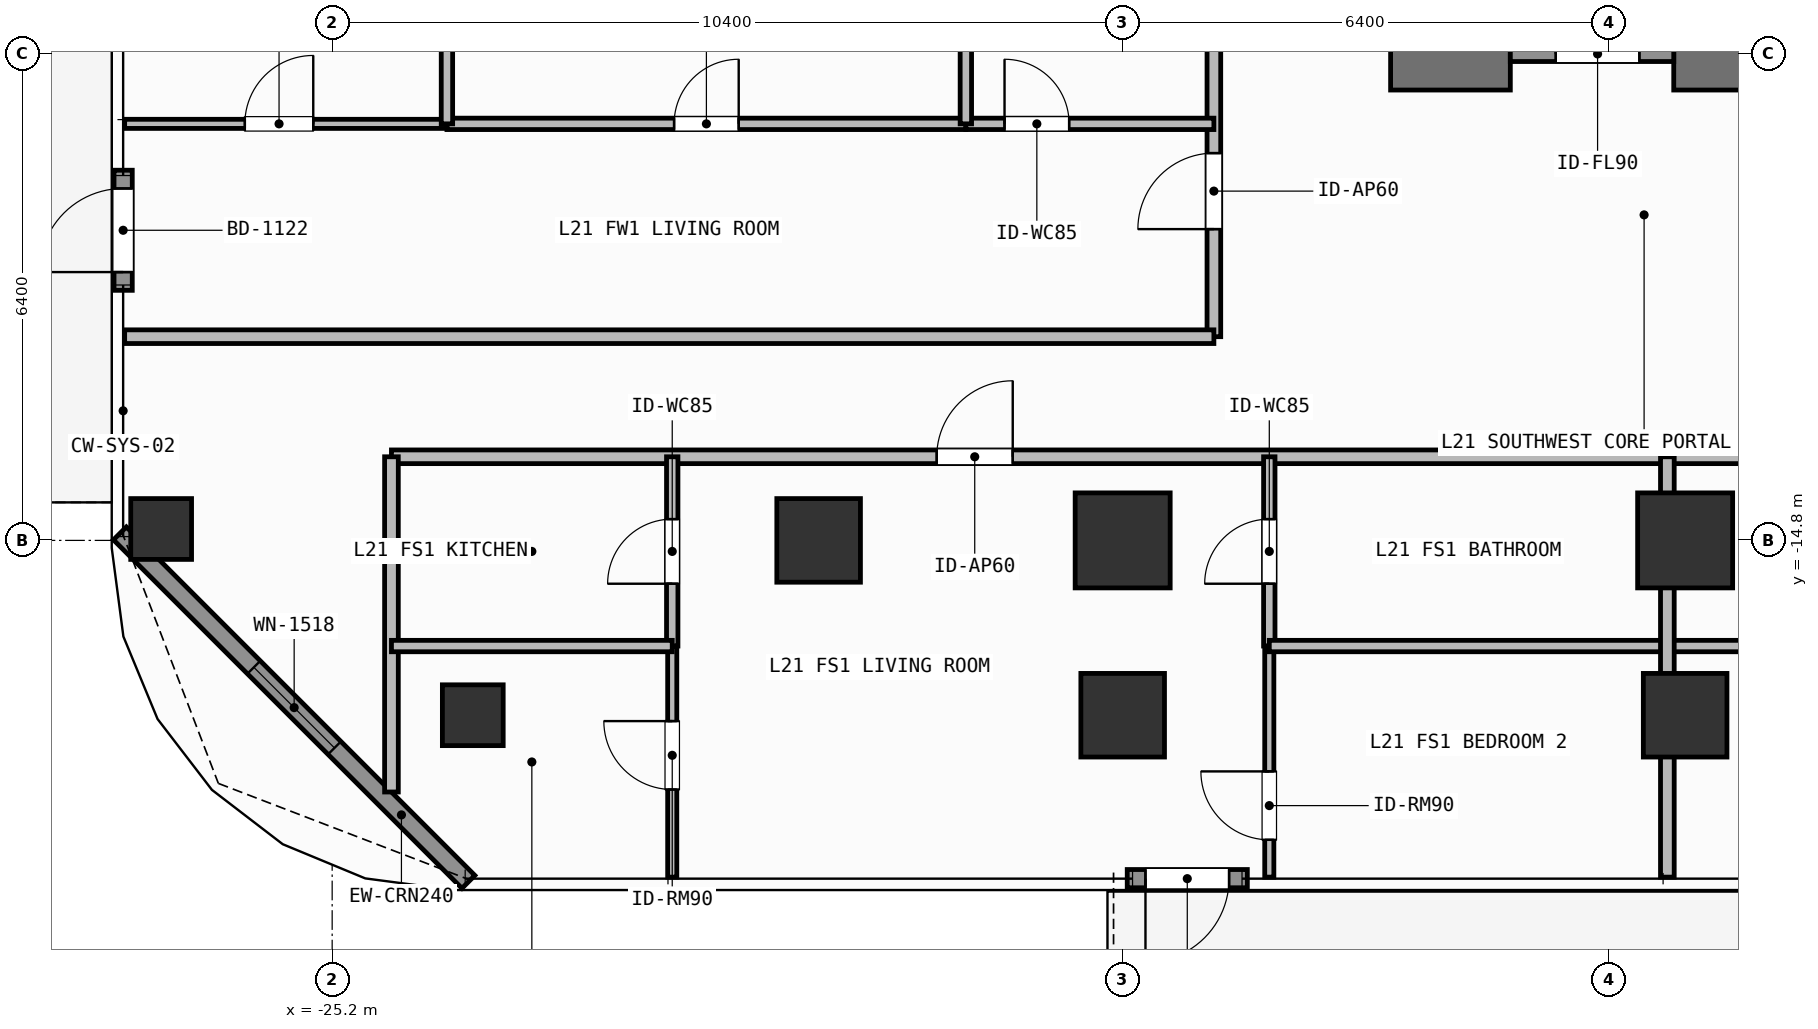
"""IFC4 building model, lengths in metres.
Left out: names, types, materials, properties, quantities, classifications, styles, units other than length and angle.
Written with IfcOpenShell. Run it as: python <this file> out.ifc"""

import sys

from ifc_helpers import new_model, si_unit, direction, frame, frame_2d, origin, origin_2d, place, context, subcontext, project, spatial, rectangle, hollow_rectangle, extrude, element, fill, save


model = new_model("IFC4")
c1 = context("Model", 3, precision=1e-05, world=origin(), true_north=direction((0.0, 1.0)))
c2 = subcontext(c1, "Body", "Model", "MODEL_VIEW")
j1 = project(units=[si_unit("LENGTHUNIT", "METRE"), si_unit("PLANEANGLEUNIT", "RADIAN")], contexts=[c1])
p1 = place(None, origin())
s1 = spatial("IfcSite", under=j1, at=p1, CompositionType="ELEMENT")
p2 = place(p1, origin())
s2 = spatial("IfcBuilding", under=s1, at=p2, CompositionType="ELEMENT")
p3 = place(p2, frame((0.0, 0.0, 85.2)))
s3 = spatial("IfcBuildingStorey", under=s2, at=p3, CompositionType="ELEMENT", Elevation=85.2)
p4 = place(p3, frame((-11.275, -8.4, 0.0), z_axis=(0.0, 0.0, 1.0), x_axis=(1.0, 0.0, 0.0)))
e1 = element("IfcWall", 1, at=p4, inside=s3, PredefinedType="SHEAR", context=c2, shape_type="SweptSolid", body=[
    extrude(rectangle(XDim=1.575, YDim=0.95, at=frame_2d((0.788, 0.0))), origin(), (0.0, 0.0, 1.0), 3.9),
])
p5 = place(p3, frame((-7.55, -8.4, 0.0), z_axis=(0.0, 0.0, 1.0), x_axis=(1.0, 0.0, 0.0)))
e2 = element("IfcWall", 2, at=p5, inside=s3, PredefinedType="SHEAR", context=c2, shape_type="SweptSolid", body=[
    extrude(rectangle(XDim=3.35, YDim=0.95, at=frame_2d((1.675, 0.0))), origin(), (0.0, 0.0, 1.0), 3.9),
])
for number, where, z_axis, x_axis in (
    (3, (-14.8, -14.8, 0.0), (0.0, 0.0, 1.0), (1.0, 0.0, 0.0)),
    (4, (-7.4, -14.8, 0.0), (0.0, 0.0, 1.0), (1.0, 0.0, 0.0)),
):
    element("IfcColumn", number, at=place(p3, frame(where, z_axis=z_axis, x_axis=x_axis)), inside=s3, PredefinedType="COLUMN", context=c2, shape_type="SweptSolid", body=[
        extrude(rectangle(XDim=1.25, YDim=1.25, at=origin_2d()), origin(), (0.0, 0.0, 1.0), 3.9),
    ])
for number, where, z_axis, x_axis in (
    (5, (-18.8, -14.8, 0.0), (0.0, 0.0, 1.0), (1.0, 0.0, 0.0)),
    (6, (-14.8, -17.1, 0.0), (0.0, 0.0, 1.0), (1.0, 0.0, 0.0)),
    (7, (-7.4, -17.1, 0.0), (0.0, 0.0, 1.0), (1.0, 0.0, 0.0)),
):
    element("IfcColumn", number, at=place(p3, frame(where, z_axis=z_axis, x_axis=x_axis)), inside=s3, PredefinedType="COLUMN", context=c2, shape_type="SweptSolid", body=[
        extrude(rectangle(XDim=1.1, YDim=1.1, at=origin_2d()), origin(), (0.0, 0.0, 1.0), 3.9),
    ])
for number, where, z_axis, x_axis in (
    (8, (-23.35, -17.1, 0.0), (0.0, 0.0, 1.0), (1.0, 0.0, 0.0)),
    (9, (-27.45, -14.65, 0.0), (0.0, 0.0, 1.0), (1.0, 0.0, 0.0)),
):
    element("IfcColumn", number, at=place(p3, frame(where, z_axis=z_axis, x_axis=x_axis)), inside=s3, PredefinedType="COLUMN", context=c2, shape_type="SweptSolid", body=[
        extrude(hollow_rectangle(XDim=0.8, YDim=0.8, WallThickness=0.036, at=origin_2d()), origin(), (0.0, 0.0, 1.0), 3.9),
    ])
p6 = place(p3, frame((-13.16, -19.25, 0.0), z_axis=(0.0, 0.0, 1.0), x_axis=(-1.0, 0.0, 0.0)))
e10 = element("IfcWall", 10, at=p6, inside=s3, PredefinedType="SOLIDWALL", context=c2, shape_type="SweptSolid", body=[
    extrude(rectangle(XDim=1.58, YDim=0.24, at=frame_2d((0.79, 0.0))), origin(), (0.0, 0.0, 1.0), 3.68),
])
p7 = place(p6, frame((0.24, 0.0, 0.0)))
e11 = element("IfcOpeningElement", 11, at=p7, cuts=e10, PredefinedType="OPENING", context=c2, shape_type="SweptSolid", body=[
    extrude(rectangle(XDim=1.1, YDim=2.2, at=frame_2d((0.55, 1.1))), frame((0.0, 0.13, 0.0), z_axis=(0.0, -1.0, 0.0), x_axis=(1.0, 0.0, 0.0)), (0.0, 0.0, 1.0), 0.26),
])
p8 = place(p3, frame((-27.95, -11.51, 0.0), z_axis=(0.0, 0.0, 1.0), x_axis=(0.0, 1.0, 0.0)))
e12 = element("IfcWall", 12, at=p8, inside=s3, PredefinedType="SOLIDWALL", context=c2, shape_type="SweptSolid", body=[
    extrude(rectangle(XDim=1.58, YDim=0.24, at=frame_2d((0.79, 0.0))), origin(), (0.0, 0.0, 1.0), 3.68),
])
p9 = place(p8, frame((0.24, 0.0, 0.0)))
e13 = element("IfcOpeningElement", 13, at=p9, cuts=e12, PredefinedType="OPENING", context=c2, shape_type="SweptSolid", body=[
    extrude(rectangle(XDim=1.1, YDim=2.2, at=frame_2d((0.55, 1.1))), frame((0.0, 0.13, 0.0), z_axis=(0.0, -1.0, 0.0), x_axis=(1.0, 0.0, 0.0)), (0.0, 0.0, 1.0), 0.26),
])
p10 = place(p3, frame((-23.408, -19.292, 0.0), z_axis=(0.0, 0.0, 1.0), x_axis=(-0.707087954376, 0.707125607496, 0.0)))
e14 = element("IfcWall", 14, at=p10, inside=s3, PredefinedType="SOLIDWALL", context=c2, shape_type="SweptSolid", body=[
    extrude(rectangle(XDim=6.484, YDim=0.24, at=frame_2d((3.242, 0.0))), origin(), (0.0, 0.0, 1.0), 3.68),
])
p11 = place(p10, frame((2.492, 0.0, 0.8)))
e15 = element("IfcOpeningElement", 15, at=p11, cuts=e14, PredefinedType="OPENING", context=c2, shape_type="SweptSolid", body=[
    extrude(rectangle(XDim=1.5, YDim=1.85, at=frame_2d((0.75, 0.925))), frame((0.0, 0.13, 0.0), z_axis=(0.0, -1.0, 0.0), x_axis=(1.0, 0.0, 0.0)), (0.0, 0.0, 1.0), 0.26),
])
p12 = place(p3, frame((-9.7, -8.4, 0.0), z_axis=(0.0, 0.0, 1.0), x_axis=(1.0, 0.0, 0.0)))
e16 = element("IfcWall", 16, at=p12, inside=s3, PredefinedType="SOLIDWALL", context=c2, shape_type="SweptSolid", body=[
    extrude(rectangle(XDim=2.15, YDim=0.2, at=frame_2d((1.075, 0.0))), origin(), (0.0, 0.0, 1.0), 2.72),
])
p13 = place(p12, frame((0.598, 0.0, 0.0)))
e17 = element("IfcOpeningElement", 17, at=p13, cuts=e16, PredefinedType="OPENING", context=c2, shape_type="SweptSolid", body=[
    extrude(rectangle(XDim=1.1, YDim=2.15, at=frame_2d((0.55, 1.075))), frame((0.0, 0.11, 0.0), z_axis=(0.0, -1.0, 0.0), x_axis=(1.0, 0.0, 0.0)), (0.0, 0.0, 1.0), 0.22),
])
p14 = place(p3, frame((-24.42, -13.7, 0.0), z_axis=(0.0, 0.0, 1.0), x_axis=(1.0, 0.0, 0.0)))
e18 = element("IfcWall", 18, at=p14, inside=s3, PredefinedType="PARTITIONING", context=c2, shape_type="SweptSolid", body=[
    extrude(rectangle(XDim=16.786, YDim=0.18, at=frame_2d((8.393, 0.0))), origin(), (0.0, 0.0, 1.0), 3.68),
])
p15 = place(p14, frame((7.174, 0.0, 0.0)))
e19 = element("IfcOpeningElement", 19, at=p15, cuts=e18, PredefinedType="OPENING", context=c2, shape_type="SweptSolid", body=[
    extrude(rectangle(XDim=1.0, YDim=2.2, at=frame_2d((0.5, 1.1))), frame((0.0, 0.1, 0.0), z_axis=(0.0, -1.0, 0.0), x_axis=(1.0, 0.0, 0.0)), (0.0, 0.0, 1.0), 0.2),
])
p16 = place(p3, frame((-20.726, -16.19, 0.0), z_axis=(0.0, 0.0, 1.0), x_axis=(0.0, 1.0, 0.0)))
e20 = element("IfcWall", 20, at=p16, inside=s3, PredefinedType="PARTITIONING", context=c2, shape_type="SweptSolid", body=[
    extrude(rectangle(XDim=2.49, YDim=0.15, at=frame_2d((1.245, 0.0))), origin(), (0.0, 0.0, 1.0), 3.68),
])
p17 = place(p16, frame((0.82, 0.0, 0.0)))
e21 = element("IfcOpeningElement", 21, at=p17, cuts=e20, PredefinedType="OPENING", context=c2, shape_type="SweptSolid", body=[
    extrude(rectangle(XDim=0.85, YDim=2.1, at=frame_2d((0.425, 1.05))), frame((0.0, 0.085, 0.0), z_axis=(0.0, -1.0, 0.0), x_axis=(1.0, 0.0, 0.0)), (0.0, 0.0, 1.0), 0.17),
])
p18 = place(p3, frame((-20.726, -19.23, 0.0), z_axis=(0.0, 0.0, 1.0), x_axis=(0.0, 1.0, 0.0)))
e22 = element("IfcWall", 22, at=p18, inside=s3, PredefinedType="PARTITIONING", context=c2, shape_type="SweptSolid", body=[
    extrude(rectangle(XDim=3.04, YDim=0.12, at=frame_2d((1.52, 0.0))), origin(), (0.0, 0.0, 1.0), 3.68),
])
p19 = place(p18, frame((1.153, 0.0, 0.0)))
e23 = element("IfcOpeningElement", 23, at=p19, cuts=e22, PredefinedType="OPENING", context=c2, shape_type="SweptSolid", body=[
    extrude(rectangle(XDim=0.9, YDim=2.1, at=frame_2d((0.45, 1.05))), frame((0.0, 0.07, 0.0), z_axis=(0.0, -1.0, 0.0), x_axis=(1.0, 0.0, 0.0)), (0.0, 0.0, 1.0), 0.14),
])
p20 = place(p3, frame((-12.871, -16.19, 0.0), z_axis=(0.0, 0.0, 1.0), x_axis=(0.0, 1.0, 0.0)))
e24 = element("IfcWall", 24, at=p20, inside=s3, PredefinedType="PARTITIONING", context=c2, shape_type="SweptSolid", body=[
    extrude(rectangle(XDim=2.49, YDim=0.15, at=frame_2d((1.245, 0.0))), origin(), (0.0, 0.0, 1.0), 3.68),
])
p21 = place(p20, frame((0.82, 0.0, 0.0)))
e25 = element("IfcOpeningElement", 25, at=p21, cuts=e24, PredefinedType="OPENING", context=c2, shape_type="SweptSolid", body=[
    extrude(rectangle(XDim=0.85, YDim=2.1, at=frame_2d((0.425, 1.05))), frame((0.0, 0.085, 0.0), z_axis=(0.0, -1.0, 0.0), x_axis=(1.0, 0.0, 0.0)), (0.0, 0.0, 1.0), 0.17),
])
p22 = place(p3, frame((-12.871, -19.23, 0.0), z_axis=(0.0, 0.0, 1.0), x_axis=(0.0, 1.0, 0.0)))
e26 = element("IfcWall", 26, at=p22, inside=s3, PredefinedType="PARTITIONING", context=c2, shape_type="SweptSolid", body=[
    extrude(rectangle(XDim=3.04, YDim=0.12, at=frame_2d((1.52, 0.0))), origin(), (0.0, 0.0, 1.0), 3.68),
])
p23 = place(p22, frame((0.491, 0.0, 0.0)))
e27 = element("IfcOpeningElement", 27, at=p23, cuts=e26, PredefinedType="OPENING", context=c2, shape_type="SweptSolid", body=[
    extrude(rectangle(XDim=0.9, YDim=2.1, at=frame_2d((0.45, 1.05))), frame((0.0, 0.07, 0.0), z_axis=(0.0, -1.0, 0.0), x_axis=(1.0, 0.0, 0.0)), (0.0, 0.0, 1.0), 0.14),
])
p24 = place(p3, frame((-7.634, -13.7, 0.0), z_axis=(0.0, 0.0, 1.0), x_axis=(1.0, 0.0, 0.0)))
e28 = element("IfcWall", 28, at=p24, inside=s3, PredefinedType="PARTITIONING", context=c2, shape_type="SweptSolid", body=[
    extrude(rectangle(XDim=26.254, YDim=0.18, at=frame_2d((13.127, 0.0))), origin(), (0.0, 0.0, 1.0), 3.68),
])
p25 = place(p24, frame((12.178, 0.0, 0.0)))
e29 = element("IfcOpeningElement", 29, at=p25, cuts=e28, PredefinedType="OPENING", context=c2, shape_type="SweptSolid", body=[
    extrude(rectangle(XDim=1.0, YDim=2.2, at=frame_2d((0.5, 1.1))), frame((0.0, 0.1, 0.0), z_axis=(0.0, -1.0, 0.0), x_axis=(1.0, 0.0, 0.0)), (0.0, 0.0, 1.0), 0.2),
])
p26 = place(p3, frame((-13.6, -12.12, 0.0), z_axis=(0.0, 0.0, 1.0), x_axis=(0.0, 1.0, 0.0)))
e30 = element("IfcWall", 30, at=p26, inside=s3, PredefinedType="PARTITIONING", context=c2, shape_type="SweptSolid", body=[
    extrude(rectangle(XDim=9.389, YDim=0.18, at=frame_2d((4.695, 0.0))), origin(), (0.0, 0.0, 1.0), 3.68),
])
p27 = place(p26, frame((1.415, 0.0, 0.0)))
e31 = element("IfcOpeningElement", 31, at=p27, cuts=e30, PredefinedType="OPENING", context=c2, shape_type="SweptSolid", body=[
    extrude(rectangle(XDim=1.0, YDim=2.2, at=frame_2d((0.5, 1.1))), frame((0.0, 0.1, 0.0), z_axis=(0.0, -1.0, 0.0), x_axis=(1.0, 0.0, 0.0)), (0.0, 0.0, 1.0), 0.2),
])
p28 = place(p3, frame((-23.69, -9.32, 0.0), z_axis=(0.0, 0.0, 1.0), x_axis=(1.0, 0.0, 0.0)))
e32 = element("IfcWall", 32, at=p28, inside=s3, PredefinedType="PARTITIONING", context=c2, shape_type="SweptSolid", body=[
    extrude(rectangle(XDim=6.827, YDim=0.15, at=frame_2d((3.414, 0.0))), origin(), (0.0, 0.0, 1.0), 3.68),
])
p29 = place(p28, frame((2.989, 0.0, 0.0)))
e33 = element("IfcOpeningElement", 33, at=p29, cuts=e32, PredefinedType="OPENING", context=c2, shape_type="SweptSolid", body=[
    extrude(rectangle(XDim=0.85, YDim=2.1, at=frame_2d((0.425, 1.05))), frame((0.0, 0.085, 0.0), z_axis=(0.0, -1.0, 0.0), x_axis=(1.0, 0.0, 0.0)), (0.0, 0.0, 1.0), 0.17),
])
p30 = place(p3, frame((-16.863, -9.32, 0.0), z_axis=(0.0, 0.0, 1.0), x_axis=(1.0, 0.0, 0.0)))
e34 = element("IfcWall", 34, at=p30, inside=s3, PredefinedType="PARTITIONING", context=c2, shape_type="SweptSolid", body=[
    extrude(rectangle(XDim=3.263, YDim=0.15, at=frame_2d((1.631, 0.0))), origin(), (0.0, 0.0, 1.0), 3.68),
])
p31 = place(p30, frame((0.509, 0.0, 0.0)))
e35 = element("IfcOpeningElement", 35, at=p31, cuts=e34, PredefinedType="OPENING", context=c2, shape_type="SweptSolid", body=[
    extrude(rectangle(XDim=0.85, YDim=2.1, at=frame_2d((0.425, 1.05))), frame((0.0, 0.085, 0.0), z_axis=(0.0, -1.0, 0.0), x_axis=(1.0, 0.0, 0.0)), (0.0, 0.0, 1.0), 0.17),
])
p32 = place(p3, frame((-27.93, -9.32, 0.0), z_axis=(0.0, 0.0, 1.0), x_axis=(1.0, 0.0, 0.0)))
e36 = element("IfcWall", 36, at=p32, inside=s3, PredefinedType="PARTITIONING", context=c2, shape_type="SweptSolid", body=[
    extrude(rectangle(XDim=4.24, YDim=0.12, at=frame_2d((2.12, 0.0))), origin(), (0.0, 0.0, 1.0), 3.68),
])
p33 = place(p32, frame((1.581, 0.0, 0.0)))
e37 = element("IfcOpeningElement", 37, at=p33, cuts=e36, PredefinedType="OPENING", context=c2, shape_type="SweptSolid", body=[
    extrude(rectangle(XDim=0.9, YDim=2.1, at=frame_2d((0.45, 1.05))), frame((0.0, 0.07, 0.0), z_axis=(0.0, -1.0, 0.0), x_axis=(1.0, 0.0, 0.0)), (0.0, 0.0, 1.0), 0.14),
])
p34 = place(p3, frame((-24.42, -18.11, 0.0), z_axis=(0.0, 0.0, 1.0), x_axis=(0.0, 1.0, 0.0)))
e38 = element("IfcWall", 38, at=p34, inside=s3, PredefinedType="PARTITIONING", context=c2, shape_type="SweptSolid", body=[
    extrude(rectangle(XDim=4.41, YDim=0.18, at=frame_2d((2.205, 0.0))), origin(), (0.0, 0.0, 1.0), 3.68),
])
p35 = place(p3, frame((-24.42, -16.19, 0.0), z_axis=(0.0, 0.0, 1.0), x_axis=(1.0, 0.0, 0.0)))
e39 = element("IfcWall", 39, at=p35, inside=s3, PredefinedType="PARTITIONING", context=c2, shape_type="SweptSolid", body=[
    extrude(rectangle(XDim=3.694, YDim=0.15, at=frame_2d((1.847, 0.0))), origin(), (0.0, 0.0, 1.0), 3.68),
])
p36 = place(p3, frame((-12.871, -16.19, 0.0), z_axis=(0.0, 0.0, 1.0), x_axis=(1.0, 0.0, 0.0)))
e40 = element("IfcWall", 40, at=p36, inside=s3, PredefinedType="PARTITIONING", context=c2, shape_type="SweptSolid", body=[
    extrude(rectangle(XDim=5.237, YDim=0.15, at=frame_2d((2.619, 0.0))), origin(), (0.0, 0.0, 1.0), 3.68),
])
p37 = place(p3, frame((-7.634, -16.19, 0.0), z_axis=(0.0, 0.0, 1.0), x_axis=(1.0, 0.0, 0.0)))
e41 = element("IfcWall", 41, at=p37, inside=s3, PredefinedType="PARTITIONING", context=c2, shape_type="SweptSolid", body=[
    extrude(rectangle(XDim=5.394, YDim=0.15, at=frame_2d((2.697, 0.0))), origin(), (0.0, 0.0, 1.0), 3.68),
])
p38 = place(p3, frame((-7.634, -19.23, 0.0), z_axis=(0.0, 0.0, 1.0), x_axis=(0.0, 1.0, 0.0)))
e42 = element("IfcWall", 42, at=p38, inside=s3, PredefinedType="PARTITIONING", context=c2, shape_type="SweptSolid", body=[
    extrude(rectangle(XDim=5.53, YDim=0.18, at=frame_2d((2.765, 0.0))), origin(), (0.0, 0.0, 1.0), 3.082),
])
for number, where, z_axis, x_axis in (
    (43, (-16.863, -9.32, 0.0), (0.0, 0.0, 1.0), (0.0, 1.0, 0.0)),
    (44, (-23.69, -9.32, 0.0), (0.0, 0.0, 1.0), (0.0, 1.0, 0.0)),
):
    element("IfcWall", number, at=place(p3, frame(where, z_axis=z_axis, x_axis=x_axis)), inside=s3, PredefinedType="PARTITIONING", context=c2, shape_type="SweptSolid", body=[
        extrude(rectangle(XDim=6.589, YDim=0.15, at=frame_2d((3.294, 0.0))), origin(), (0.0, 0.0, 1.0), 3.68),
    ])
p39 = place(p3, frame((-27.93, -12.12, 0.0), z_axis=(0.0, 0.0, 1.0), x_axis=(1.0, 0.0, 0.0)))
e45 = element("IfcWall", 45, at=p39, inside=s3, PredefinedType="PARTITIONING", context=c2, shape_type="SweptSolid", body=[
    extrude(rectangle(XDim=14.33, YDim=0.18, at=frame_2d((7.165, 0.0))), origin(), (0.0, 0.0, 1.0), 3.68),
])
p40 = place(p7, origin())
e46 = element("IfcDoor", 46, at=p40, inside=s3, OperationType="SINGLE_SWING_RIGHT", PredefinedType="DOOR", context=c2, shape_type="SweptSolid", body=[
    extrude(rectangle(XDim=1.1, YDim=2.2, at=frame_2d((0.55, 1.1))), frame((0.0, 0.025, 0.0), z_axis=(0.0, -1.0, 0.0), x_axis=(1.0, 0.0, 0.0)), (0.0, 0.0, 1.0), 0.05),
])
fill(e11, e46)
p41 = place(p9, origin())
e47 = element("IfcDoor", 47, at=p41, inside=s3, OperationType="SINGLE_SWING_LEFT", PredefinedType="DOOR", context=c2, shape_type="SweptSolid", body=[
    extrude(rectangle(XDim=1.1, YDim=2.2, at=frame_2d((0.55, 1.1))), frame((0.0, 0.025, 0.0), z_axis=(0.0, -1.0, 0.0), x_axis=(1.0, 0.0, 0.0)), (0.0, 0.0, 1.0), 0.05),
])
fill(e13, e47)
p42 = place(p11, origin())
e48 = element("IfcWindow", 48, at=p42, inside=s3, PartitioningType="SINGLE_PANEL", PredefinedType="WINDOW", context=c2, shape_type="SweptSolid", body=[
    extrude(rectangle(XDim=1.5, YDim=1.85, at=frame_2d((0.75, 0.925))), frame((0.0, 0.03, 0.0), z_axis=(0.0, -1.0, 0.0), x_axis=(1.0, 0.0, 0.0)), (0.0, 0.0, 1.0), 0.06),
])
fill(e15, e48)
p43 = place(p13, origin())
e49 = element("IfcDoor", 49, at=p43, inside=s3, OperationType="SINGLE_SWING_LEFT", PredefinedType="DOOR", context=c2, shape_type="SweptSolid", body=[
    extrude(rectangle(XDim=1.1, YDim=2.15, at=frame_2d((0.55, 1.075))), frame((0.0, 0.025, 0.0), z_axis=(0.0, -1.0, 0.0), x_axis=(1.0, 0.0, 0.0)), (0.0, 0.0, 1.0), 0.05),
])
fill(e17, e49)
p44 = place(p15, origin())
e50 = element("IfcDoor", 50, at=p44, inside=s3, OperationType="SINGLE_SWING_RIGHT", PredefinedType="DOOR", context=c2, shape_type="SweptSolid", body=[
    extrude(rectangle(XDim=1.0, YDim=2.2, at=frame_2d((0.5, 1.1))), frame((0.0, 0.025, 0.0), z_axis=(0.0, -1.0, 0.0), x_axis=(1.0, 0.0, 0.0)), (0.0, 0.0, 1.0), 0.05),
])
fill(e19, e50)
p45 = place(p17, origin())
e51 = element("IfcDoor", 51, at=p45, inside=s3, OperationType="SINGLE_SWING_LEFT", PredefinedType="DOOR", context=c2, shape_type="SweptSolid", body=[
    extrude(rectangle(XDim=0.85, YDim=2.1, at=frame_2d((0.425, 1.05))), frame((0.0, 0.025, 0.0), z_axis=(0.0, -1.0, 0.0), x_axis=(1.0, 0.0, 0.0)), (0.0, 0.0, 1.0), 0.05),
])
fill(e21, e51)
p46 = place(p19, origin())
e52 = element("IfcDoor", 52, at=p46, inside=s3, OperationType="SINGLE_SWING_RIGHT", PredefinedType="DOOR", context=c2, shape_type="SweptSolid", body=[
    extrude(rectangle(XDim=0.9, YDim=2.1, at=frame_2d((0.45, 1.05))), frame((0.0, 0.025, 0.0), z_axis=(0.0, -1.0, 0.0), x_axis=(1.0, 0.0, 0.0)), (0.0, 0.0, 1.0), 0.05),
])
fill(e23, e52)
p47 = place(p21, origin())
e53 = element("IfcDoor", 53, at=p47, inside=s3, OperationType="SINGLE_SWING_LEFT", PredefinedType="DOOR", context=c2, shape_type="SweptSolid", body=[
    extrude(rectangle(XDim=0.85, YDim=2.1, at=frame_2d((0.425, 1.05))), frame((0.0, 0.025, 0.0), z_axis=(0.0, -1.0, 0.0), x_axis=(1.0, 0.0, 0.0)), (0.0, 0.0, 1.0), 0.05),
])
fill(e25, e53)
p48 = place(p23, origin())
e54 = element("IfcDoor", 54, at=p48, inside=s3, OperationType="SINGLE_SWING_RIGHT", PredefinedType="DOOR", context=c2, shape_type="SweptSolid", body=[
    extrude(rectangle(XDim=0.9, YDim=2.1, at=frame_2d((0.45, 1.05))), frame((0.0, 0.025, 0.0), z_axis=(0.0, -1.0, 0.0), x_axis=(1.0, 0.0, 0.0)), (0.0, 0.0, 1.0), 0.05),
])
fill(e27, e54)
p49 = place(p27, origin())
e55 = element("IfcDoor", 55, at=p49, inside=s3, OperationType="SINGLE_SWING_LEFT", PredefinedType="DOOR", context=c2, shape_type="SweptSolid", body=[
    extrude(rectangle(XDim=1.0, YDim=2.2, at=frame_2d((0.5, 1.1))), frame((0.0, 0.025, 0.0), z_axis=(0.0, -1.0, 0.0), x_axis=(1.0, 0.0, 0.0)), (0.0, 0.0, 1.0), 0.05),
])
fill(e31, e55)
p50 = place(p29, origin())
e56 = element("IfcDoor", 56, at=p50, inside=s3, OperationType="SINGLE_SWING_RIGHT", PredefinedType="DOOR", context=c2, shape_type="SweptSolid", body=[
    extrude(rectangle(XDim=0.85, YDim=2.1, at=frame_2d((0.425, 1.05))), frame((0.0, 0.025, 0.0), z_axis=(0.0, -1.0, 0.0), x_axis=(1.0, 0.0, 0.0)), (0.0, 0.0, 1.0), 0.05),
])
fill(e33, e56)
p51 = place(p31, origin())
e57 = element("IfcDoor", 57, at=p51, inside=s3, OperationType="SINGLE_SWING_LEFT", PredefinedType="DOOR", context=c2, shape_type="SweptSolid", body=[
    extrude(rectangle(XDim=0.85, YDim=2.1, at=frame_2d((0.425, 1.05))), frame((0.0, 0.025, 0.0), z_axis=(0.0, -1.0, 0.0), x_axis=(1.0, 0.0, 0.0)), (0.0, 0.0, 1.0), 0.05),
])
fill(e35, e57)
p52 = place(p33, origin())
e58 = element("IfcDoor", 58, at=p52, inside=s3, OperationType="SINGLE_SWING_RIGHT", PredefinedType="DOOR", context=c2, shape_type="SweptSolid", body=[
    extrude(rectangle(XDim=0.9, YDim=2.1, at=frame_2d((0.45, 1.05))), frame((0.0, 0.025, 0.0), z_axis=(0.0, -1.0, 0.0), x_axis=(1.0, 0.0, 0.0)), (0.0, 0.0, 1.0), 0.05),
])
fill(e37, e58)
save(model, sys.argv[1])
